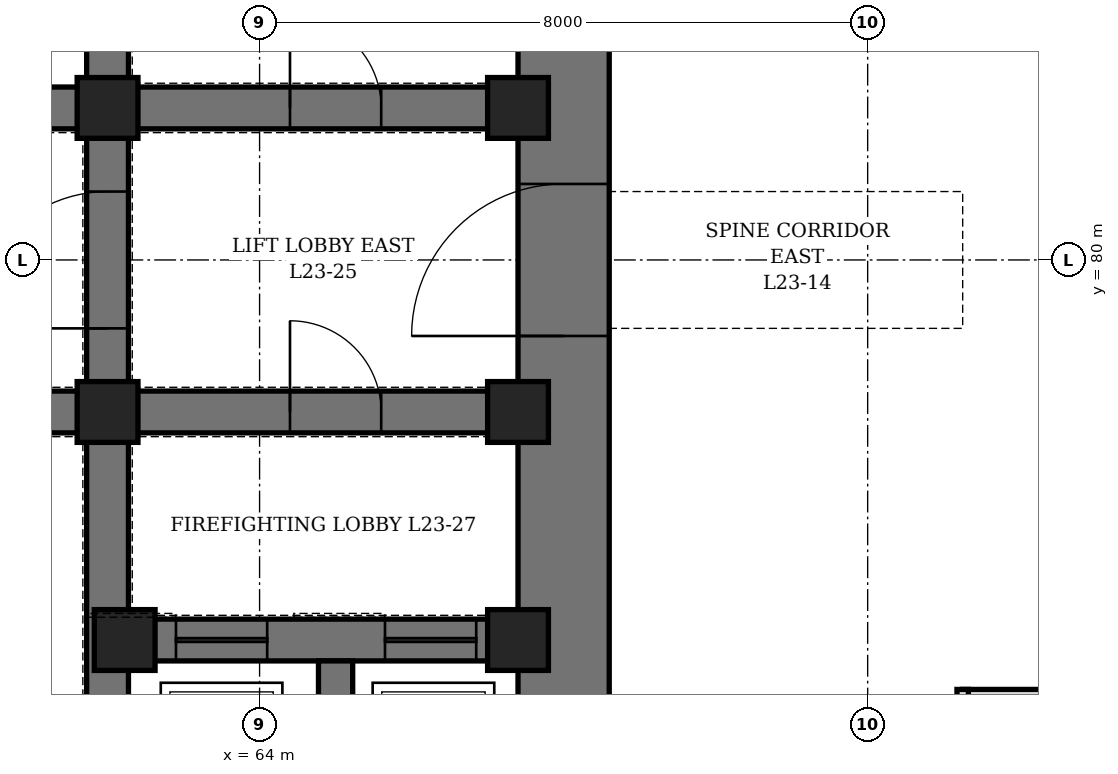
"""IFC4 building model, lengths in metres.
Left out: names, types, materials, properties, quantities, classifications, styles, units other than length and angle.
Written with IfcOpenShell. Run it as: python <this file> out.ifc"""

import sys

from ifc_helpers import new_model, si_unit, direction, frame, frame_2d, origin, origin_2d, place, context, subcontext, project, spatial, rectangle, hollow_rectangle, extrude, element, fill, save


model = new_model("IFC4")
c1 = context("Model", 3, precision=1e-05, world=origin(), true_north=direction((0.0, 1.0)))
c2 = subcontext(c1, "Body", "Model", "MODEL_VIEW")
j1 = project(units=[si_unit("LENGTHUNIT", "METRE"), si_unit("PLANEANGLEUNIT", "RADIAN")], contexts=[c1])
p1 = place(None, origin())
s1 = spatial("IfcSite", under=j1, at=p1, CompositionType="ELEMENT")
p2 = place(p1, origin())
s2 = spatial("IfcBuilding", under=s1, at=p2, CompositionType="ELEMENT")
p3 = place(p2, frame((0.0, 0.0, 108.1)))
s3 = spatial("IfcBuildingStorey", under=s2, at=p3, CompositionType="ELEMENT", Elevation=108.1)
p4 = place(p3, frame((68.0, 70.4, 0.0), z_axis=(0.0, 0.0, 1.0), x_axis=(0.0, 1.0, 0.0)))
e1 = element("IfcWall", 1, at=p4, inside=s3, PredefinedType="SHEAR", context=c2, shape_type="SweptSolid", body=[
    extrude(rectangle(XDim=19.2, YDim=1.2, at=frame_2d((9.6, 0.0))), origin(), (0.0, 0.0, 1.0), 4.2),
])
p5 = place(p4, frame((8.6, 0.0, 0.0)))
e2 = element("IfcOpeningElement", 2, at=p5, cuts=e1, PredefinedType="OPENING", context=c2, shape_type="SweptSolid", body=[
    extrude(rectangle(XDim=2.0, YDim=2.4, at=frame_2d((1.0, 1.2))), frame((0.0, 0.61, 0.0), z_axis=(0.0, -1.0, 0.0), x_axis=(1.0, 0.0, 0.0)), (0.0, 0.0, 1.0), 1.22),
])
p6 = place(p3, frame((62.0, 71.6, 0.0), z_axis=(0.0, 0.0, 1.0), x_axis=(0.0, 1.0, 0.0)))
e3 = element("IfcWall", 3, at=p6, inside=s3, PredefinedType="SHEAR", context=c2, shape_type="SweptSolid", body=[
    extrude(rectangle(XDim=16.8, YDim=0.55, at=frame_2d((8.4, 0.0))), origin(), (0.0, 0.0, 1.0), 4.2),
])
p7 = place(p6, frame((7.5, 0.0, 0.0)))
e4 = element("IfcOpeningElement", 4, at=p7, cuts=e3, PredefinedType="OPENING", context=c2, shape_type="SweptSolid", body=[
    extrude(rectangle(XDim=1.8, YDim=2.4, at=frame_2d((0.9, 1.2))), frame((0.0, 0.285, 0.0), z_axis=(0.0, -1.0, 0.0), x_axis=(1.0, 0.0, 0.0)), (0.0, 0.0, 1.0), 0.57),
])
p8 = place(p3, frame((62.275, 75.0, 0.0), z_axis=(0.0, 0.0, 1.0), x_axis=(1.0, 0.0, 0.0)))
e5 = element("IfcWall", 5, at=p8, inside=s3, PredefinedType="SHEAR", context=c2, shape_type="SweptSolid", body=[
    extrude(rectangle(XDim=5.125, YDim=0.55, at=frame_2d((2.562, 0.0))), origin(), (0.0, 0.0, 1.0), 4.2),
])
p9 = place(p8, frame((0.625, 0.0, 0.0)))
e6 = element("IfcOpeningElement", 6, at=p9, cuts=e5, PredefinedType="OPENING", context=c2, shape_type="SweptSolid", body=[
    extrude(rectangle(XDim=1.2, YDim=2.2, at=frame_2d((0.6, 1.1))), frame((0.0, 0.285, 0.0), z_axis=(0.0, -1.0, 0.0), x_axis=(1.0, 0.0, 0.0)), (0.0, 0.0, 1.0), 0.57),
])
p10 = place(p8, frame((3.375, 0.0, 0.0)))
e7 = element("IfcOpeningElement", 7, at=p10, cuts=e5, PredefinedType="OPENING", context=c2, shape_type="SweptSolid", body=[
    extrude(rectangle(XDim=1.2, YDim=2.2, at=frame_2d((0.6, 1.1))), frame((0.0, 0.285, 0.0), z_axis=(0.0, -1.0, 0.0), x_axis=(1.0, 0.0, 0.0)), (0.0, 0.0, 1.0), 0.57),
])
p11 = place(p3, frame((62.275, 78.0, 0.0), z_axis=(0.0, 0.0, 1.0), x_axis=(1.0, 0.0, 0.0)))
e8 = element("IfcWall", 8, at=p11, inside=s3, PredefinedType="SHEAR", context=c2, shape_type="SweptSolid", body=[
    extrude(rectangle(XDim=5.125, YDim=0.55, at=frame_2d((2.562, 0.0))), origin(), (0.0, 0.0, 1.0), 4.2),
])
p12 = place(p11, frame((2.125, 0.0, 0.0)))
e9 = element("IfcOpeningElement", 9, at=p12, cuts=e8, PredefinedType="OPENING", context=c2, shape_type="SweptSolid", body=[
    extrude(rectangle(XDim=1.2, YDim=2.1, at=frame_2d((0.6, 1.05))), frame((0.0, 0.285, 0.0), z_axis=(0.0, -1.0, 0.0), x_axis=(1.0, 0.0, 0.0)), (0.0, 0.0, 1.0), 0.57),
])
p13 = place(p3, frame((62.275, 82.0, 0.0), z_axis=(0.0, 0.0, 1.0), x_axis=(1.0, 0.0, 0.0)))
e10 = element("IfcWall", 10, at=p13, inside=s3, PredefinedType="SHEAR", context=c2, shape_type="SweptSolid", body=[
    extrude(rectangle(XDim=5.125, YDim=0.55, at=frame_2d((2.562, 0.0))), origin(), (0.0, 0.0, 1.0), 4.2),
])
p14 = place(p13, frame((2.125, 0.0, 0.0)))
e11 = element("IfcOpeningElement", 11, at=p14, cuts=e10, PredefinedType="OPENING", context=c2, shape_type="SweptSolid", body=[
    extrude(rectangle(XDim=1.2, YDim=2.1, at=frame_2d((0.6, 1.05))), frame((0.0, 0.285, 0.0), z_axis=(0.0, -1.0, 0.0), x_axis=(1.0, 0.0, 0.0)), (0.0, 0.0, 1.0), 0.57),
])
p15 = place(p3, frame((50.275, 78.0, 0.0), z_axis=(0.0, 0.0, 1.0), x_axis=(1.0, 0.0, 0.0)))
e12 = element("IfcWall", 12, at=p15, inside=s3, PredefinedType="SHEAR", context=c2, shape_type="SweptSolid", body=[
    extrude(rectangle(XDim=11.45, YDim=0.55, at=frame_2d((5.725, 0.0))), origin(), (0.0, 0.0, 1.0), 4.2),
])
p16 = place(p15, frame((0.775, 0.0, 0.0)))
e13 = element("IfcOpeningElement", 13, at=p16, cuts=e12, PredefinedType="OPENING", context=c2, shape_type="SweptSolid", body=[
    extrude(rectangle(XDim=0.9, YDim=2.1, at=frame_2d((0.45, 1.05))), frame((0.0, 0.285, 0.0), z_axis=(0.0, -1.0, 0.0), x_axis=(1.0, 0.0, 0.0)), (0.0, 0.0, 1.0), 0.57),
])
p17 = place(p15, frame((3.775, 0.0, 0.0)))
e14 = element("IfcOpeningElement", 14, at=p17, cuts=e12, PredefinedType="OPENING", context=c2, shape_type="SweptSolid", body=[
    extrude(rectangle(XDim=0.9, YDim=2.1, at=frame_2d((0.45, 1.05))), frame((0.0, 0.285, 0.0), z_axis=(0.0, -1.0, 0.0), x_axis=(1.0, 0.0, 0.0)), (0.0, 0.0, 1.0), 0.57),
])
p18 = place(p15, frame((6.775, 0.0, 0.0)))
e15 = element("IfcOpeningElement", 15, at=p18, cuts=e12, PredefinedType="OPENING", context=c2, shape_type="SweptSolid", body=[
    extrude(rectangle(XDim=0.9, YDim=2.1, at=frame_2d((0.45, 1.05))), frame((0.0, 0.285, 0.0), z_axis=(0.0, -1.0, 0.0), x_axis=(1.0, 0.0, 0.0)), (0.0, 0.0, 1.0), 0.57),
])
p19 = place(p15, frame((9.775, 0.0, 0.0)))
e16 = element("IfcOpeningElement", 16, at=p19, cuts=e12, PredefinedType="OPENING", context=c2, shape_type="SweptSolid", body=[
    extrude(rectangle(XDim=0.9, YDim=2.1, at=frame_2d((0.45, 1.05))), frame((0.0, 0.285, 0.0), z_axis=(0.0, -1.0, 0.0), x_axis=(1.0, 0.0, 0.0)), (0.0, 0.0, 1.0), 0.57),
])
p20 = place(p3, frame((50.275, 82.0, 0.0), z_axis=(0.0, 0.0, 1.0), x_axis=(1.0, 0.0, 0.0)))
e17 = element("IfcWall", 17, at=p20, inside=s3, PredefinedType="SHEAR", context=c2, shape_type="SweptSolid", body=[
    extrude(rectangle(XDim=11.45, YDim=0.55, at=frame_2d((5.725, 0.0))), origin(), (0.0, 0.0, 1.0), 4.2),
])
p21 = place(p20, frame((0.675, 0.0, 0.0)))
e18 = element("IfcOpeningElement", 18, at=p21, cuts=e17, PredefinedType="OPENING", context=c2, shape_type="SweptSolid", body=[
    extrude(rectangle(XDim=1.1, YDim=2.2, at=frame_2d((0.55, 1.1))), frame((0.0, 0.285, 0.0), z_axis=(0.0, -1.0, 0.0), x_axis=(1.0, 0.0, 0.0)), (0.0, 0.0, 1.0), 0.57),
])
p22 = place(p20, frame((3.675, 0.0, 0.0)))
e19 = element("IfcOpeningElement", 19, at=p22, cuts=e17, PredefinedType="OPENING", context=c2, shape_type="SweptSolid", body=[
    extrude(rectangle(XDim=1.1, YDim=2.2, at=frame_2d((0.55, 1.1))), frame((0.0, 0.285, 0.0), z_axis=(0.0, -1.0, 0.0), x_axis=(1.0, 0.0, 0.0)), (0.0, 0.0, 1.0), 0.57),
])
p23 = place(p20, frame((6.675, 0.0, 0.0)))
e20 = element("IfcOpeningElement", 20, at=p23, cuts=e17, PredefinedType="OPENING", context=c2, shape_type="SweptSolid", body=[
    extrude(rectangle(XDim=1.1, YDim=2.2, at=frame_2d((0.55, 1.1))), frame((0.0, 0.285, 0.0), z_axis=(0.0, -1.0, 0.0), x_axis=(1.0, 0.0, 0.0)), (0.0, 0.0, 1.0), 0.57),
])
p24 = place(p20, frame((9.675, 0.0, 0.0)))
e21 = element("IfcOpeningElement", 21, at=p24, cuts=e17, PredefinedType="OPENING", context=c2, shape_type="SweptSolid", body=[
    extrude(rectangle(XDim=1.1, YDim=2.2, at=frame_2d((0.55, 1.1))), frame((0.0, 0.285, 0.0), z_axis=(0.0, -1.0, 0.0), x_axis=(1.0, 0.0, 0.0)), (0.0, 0.0, 1.0), 0.57),
])
p25 = place(p3, frame((65.0, 71.6, 0.0), z_axis=(0.0, 0.0, 1.0), x_axis=(0.0, 1.0, 0.0)))
e22 = element("IfcWall", 22, at=p25, inside=s3, PredefinedType="SHEAR", context=c2, shape_type="SweptSolid", body=[
    extrude(rectangle(XDim=3.125, YDim=0.45, at=frame_2d((1.562, 0.0))), origin(), (0.0, 0.0, 1.0), 4.2),
])
for number, where, z_axis, x_axis in (
    (23, (62.0, 78.0, 0.0), (0.0, 0.0, 1.0), (1.0, 0.0, 0.0)),
    (24, (62.0, 82.0, 0.0), (0.0, 0.0, 1.0), (1.0, 0.0, 0.0)),
    (25, (62.225, 75.0, 0.0), (0.0, 0.0, 1.0), (1.0, 0.0, 0.0)),
    (26, (67.4, 75.0, 0.0), (0.0, 0.0, 1.0), (1.0, 0.0, 0.0)),
    (27, (67.4, 78.0, 0.0), (0.0, 0.0, 1.0), (1.0, 0.0, 0.0)),
    (28, (67.4, 82.0, 0.0), (0.0, 0.0, 1.0), (1.0, 0.0, 0.0)),
):
    element("IfcColumn", number, at=place(p3, frame(where, z_axis=z_axis, x_axis=x_axis)), inside=s3, PredefinedType="COLUMN", context=c2, shape_type="SweptSolid", body=[
        extrude(hollow_rectangle(XDim=0.8, YDim=0.8, WallThickness=0.1, at=origin_2d()), origin(), (0.0, 0.0, 1.0), 4.2),
    ])
p26 = place(p3, frame((73.25, 74.25, 0.0), z_axis=(0.0, 0.0, 1.0), x_axis=(1.0, 0.0, 0.0)))
e29 = element("IfcWall", 29, at=p26, inside=s3, PredefinedType="PARTITIONING", context=c2, shape_type="SweptSolid", body=[
    extrude(rectangle(XDim=4.75, YDim=0.2, at=frame_2d((2.375, 0.0))), origin(), (0.0, 0.0, 1.0), 3.428),
])
p27 = place(p3, frame((73.25, 65.625, 0.0), z_axis=(0.0, 0.0, 1.0), x_axis=(0.0, 1.0, 0.0)))
e30 = element("IfcWall", 30, at=p27, inside=s3, PredefinedType="PARTITIONING", context=c2, shape_type="SweptSolid", body=[
    extrude(rectangle(XDim=8.725, YDim=0.15, at=frame_2d((4.363, 0.0))), origin(), (0.0, 0.0, 1.0), 4.04),
])
p28 = place(p27, frame((0.938, 0.0, 0.0)))
e31 = element("IfcOpeningElement", 31, at=p28, cuts=e30, PredefinedType="OPENING", context=c2, shape_type="SweptSolid", body=[
    extrude(rectangle(XDim=1.0, YDim=2.4, at=frame_2d((0.5, 1.2))), frame((0.0, 0.085, 0.0), z_axis=(0.0, -1.0, 0.0), x_axis=(1.0, 0.0, 0.0)), (0.0, 0.0, 1.0), 0.17),
])
p29 = place(p27, frame((3.812, 0.0, 0.0)))
e32 = element("IfcOpeningElement", 32, at=p29, cuts=e30, PredefinedType="OPENING", context=c2, shape_type="SweptSolid", body=[
    extrude(rectangle(XDim=1.0, YDim=2.4, at=frame_2d((0.5, 1.2))), frame((0.0, 0.085, 0.0), z_axis=(0.0, -1.0, 0.0), x_axis=(1.0, 0.0, 0.0)), (0.0, 0.0, 1.0), 0.17),
])
p30 = place(p27, frame((6.688, 0.0, 0.0)))
e33 = element("IfcOpeningElement", 33, at=p30, cuts=e30, PredefinedType="OPENING", context=c2, shape_type="SweptSolid", body=[
    extrude(rectangle(XDim=1.0, YDim=2.4, at=frame_2d((0.5, 1.2))), frame((0.0, 0.085, 0.0), z_axis=(0.0, -1.0, 0.0), x_axis=(1.0, 0.0, 0.0)), (0.0, 0.0, 1.0), 0.17),
])
p31 = place(p14, origin())
e34 = element("IfcDoor", 34, at=p31, inside=s3, OperationType="SINGLE_SWING_LEFT", PredefinedType="DOOR", context=c2, shape_type="SweptSolid", body=[
    extrude(rectangle(XDim=1.2, YDim=2.1, at=frame_2d((0.6, 1.05))), frame((0.0, 0.275, 0.0), z_axis=(0.0, -1.0, 0.0), x_axis=(1.0, 0.0, 0.0)), (0.0, 0.0, 1.0), 0.55),
])
fill(e11, e34)
p32 = place(p5, origin())
e35 = element("IfcDoor", 35, at=p32, inside=s3, OperationType="DOUBLE_DOOR_SINGLE_SWING", PredefinedType="DOOR", context=c2, shape_type="SweptSolid", body=[
    extrude(rectangle(XDim=2.0, YDim=2.4, at=frame_2d((1.0, 1.2))), frame((0.0, 0.35, 0.0), z_axis=(0.0, -1.0, 0.0), x_axis=(1.0, 0.0, 0.0)), (0.0, 0.0, 1.0), 0.7),
])
fill(e2, e35)
p33 = place(p7, origin())
e36 = element("IfcDoor", 36, at=p33, inside=s3, OperationType="DOUBLE_DOOR_SINGLE_SWING", PredefinedType="DOOR", context=c2, shape_type="SweptSolid", body=[
    extrude(rectangle(XDim=1.8, YDim=2.4, at=frame_2d((0.9, 1.2))), frame((0.0, 0.275, 0.0), z_axis=(0.0, -1.0, 0.0), x_axis=(1.0, 0.0, 0.0)), (0.0, 0.0, 1.0), 0.55),
])
fill(e4, e36)
p34 = place(p12, origin())
e37 = element("IfcDoor", 37, at=p34, inside=s3, OperationType="SINGLE_SWING_RIGHT", PredefinedType="DOOR", context=c2, shape_type="SweptSolid", body=[
    extrude(rectangle(XDim=1.2, YDim=2.1, at=frame_2d((0.6, 1.05))), frame((0.0, 0.275, 0.0), z_axis=(0.0, -1.0, 0.0), x_axis=(1.0, 0.0, 0.0)), (0.0, 0.0, 1.0), 0.55),
])
fill(e9, e37)
p35 = place(p9, origin())
e38 = element("IfcDoor", 38, at=p35, inside=s3, OperationType="SLIDING_TO_LEFT", PredefinedType="DOOR", context=c2, shape_type="SweptSolid", body=[
    extrude(rectangle(XDim=1.2, YDim=2.2, at=frame_2d((0.6, 1.1))), frame((0.0, 0.275, 0.0), z_axis=(0.0, -1.0, 0.0), x_axis=(1.0, 0.0, 0.0)), (0.0, 0.0, 1.0), 0.55),
])
fill(e6, e38)
p36 = place(p10, origin())
e39 = element("IfcDoor", 39, at=p36, inside=s3, OperationType="SLIDING_TO_LEFT", PredefinedType="DOOR", context=c2, shape_type="SweptSolid", body=[
    extrude(rectangle(XDim=1.2, YDim=2.2, at=frame_2d((0.6, 1.1))), frame((0.0, 0.275, 0.0), z_axis=(0.0, -1.0, 0.0), x_axis=(1.0, 0.0, 0.0)), (0.0, 0.0, 1.0), 0.55),
])
fill(e7, e39)
save(model, sys.argv[1])
